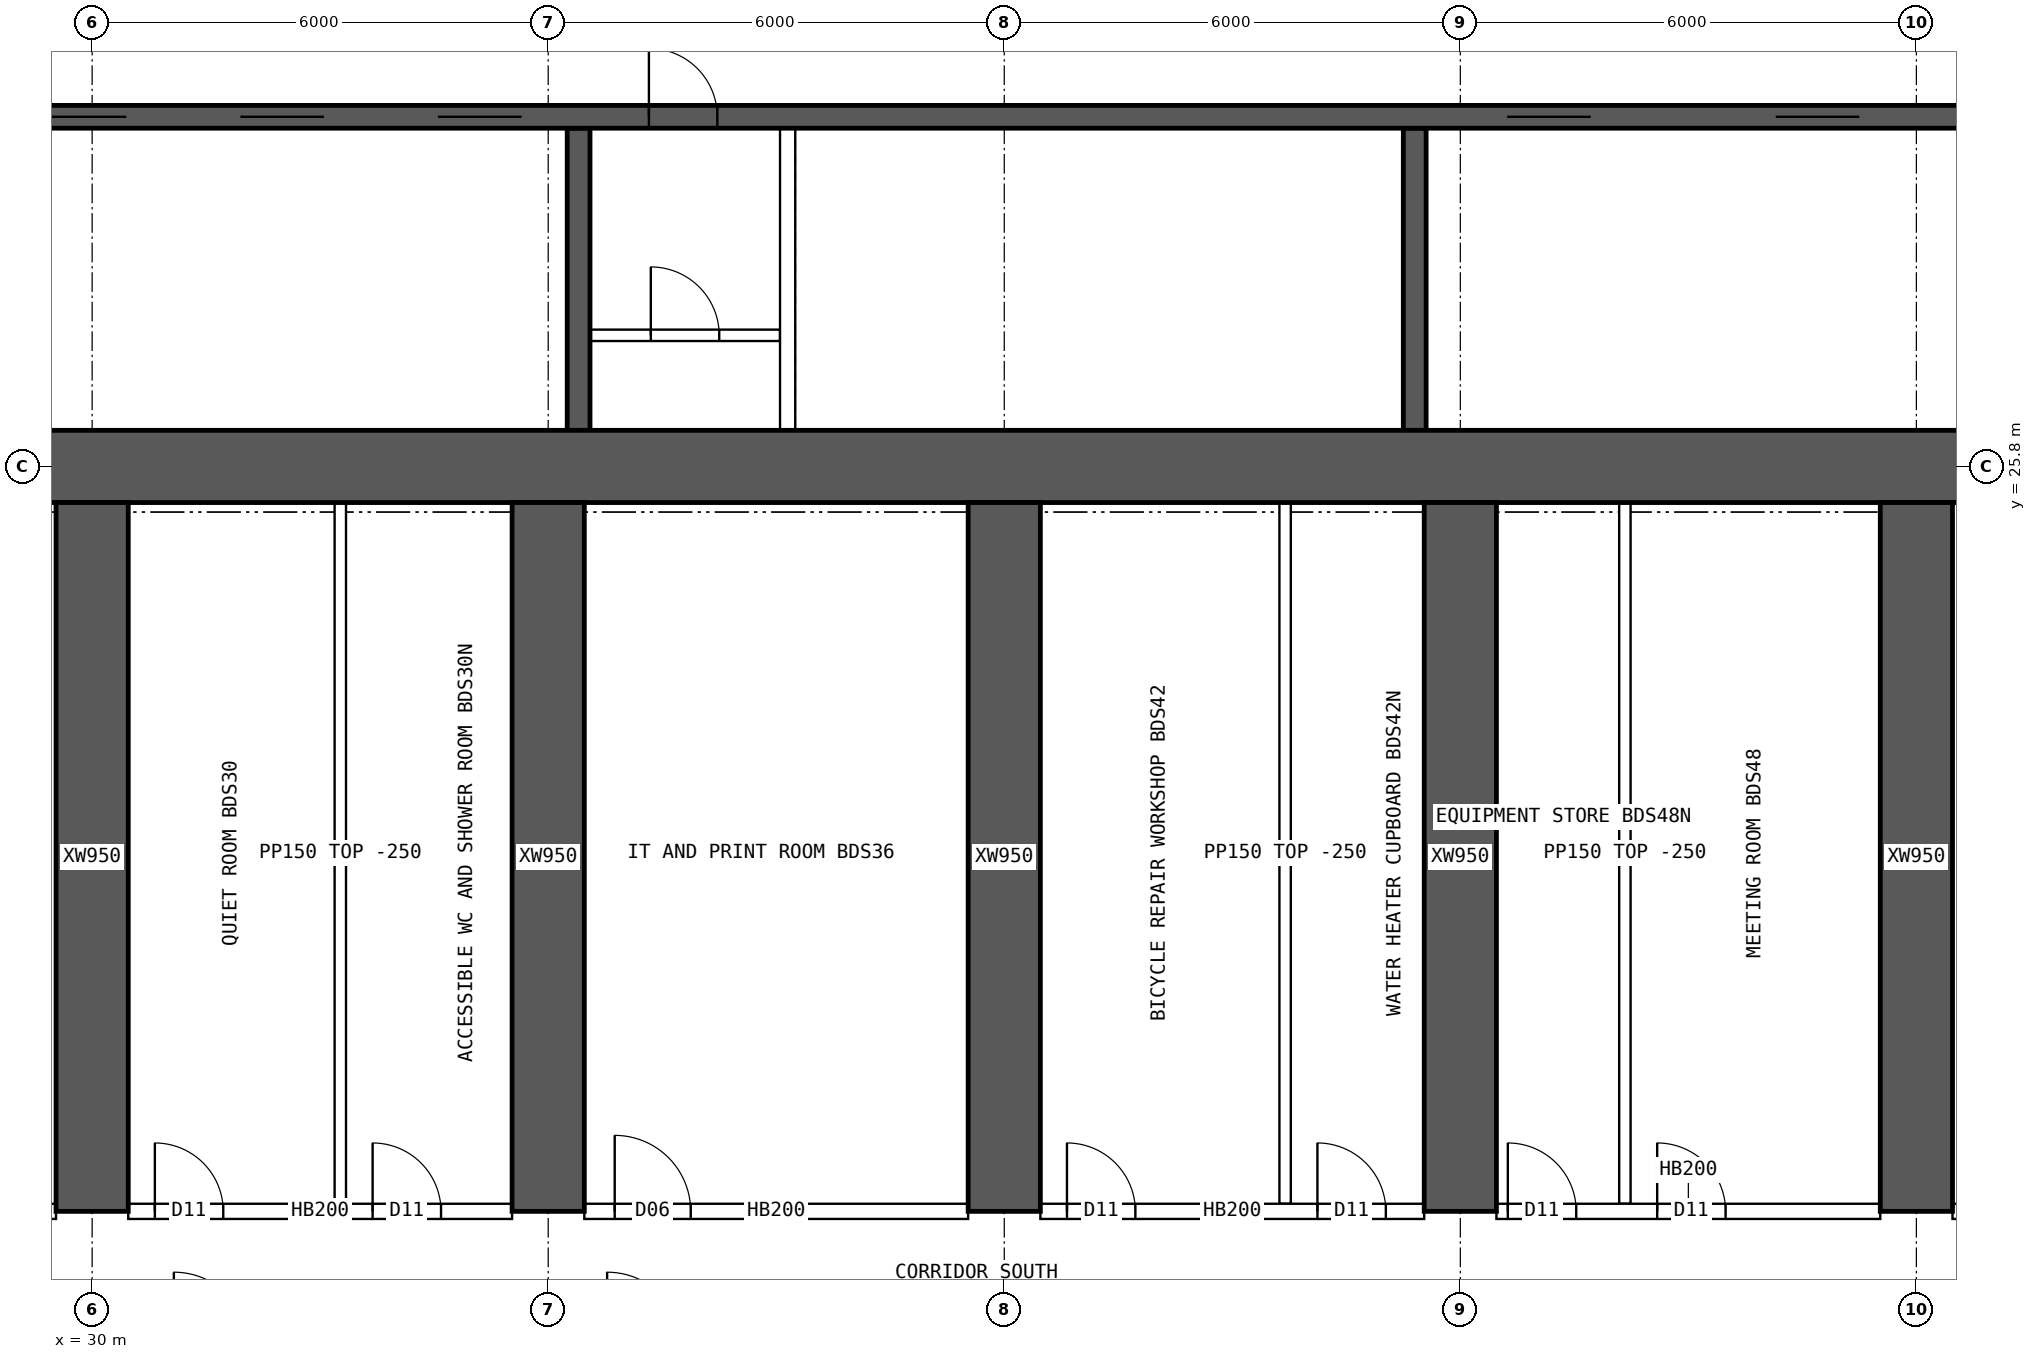
"""IFC4 building model, lengths in metres.
Left out: names, types, materials, properties, quantities, classifications, styles, units other than length and angle.
Written with IfcOpenShell. Run it as: python <this file> out.ifc"""

import sys

from ifc_helpers import new_model, si_unit, direction, frame, frame_2d, origin, place, context, subcontext, project, spatial, rectangle, extrude, element, fill, save


model = new_model("IFC4")
c1 = context("Model", 3, precision=1e-05, world=origin(), true_north=direction((0.0, 1.0)))
c2 = subcontext(c1, "Body", "Model", "MODEL_VIEW")
j1 = project(units=[si_unit("LENGTHUNIT", "METRE"), si_unit("PLANEANGLEUNIT", "RADIAN")], contexts=[c1])
p1 = place(None, origin())
s1 = spatial("IfcSite", under=j1, at=p1, CompositionType="ELEMENT")
p2 = place(p1, origin())
s2 = spatial("IfcBuilding", under=s1, at=p2, CompositionType="ELEMENT")
p3 = place(p2, frame((0.0, 0.0, 106.9)))
s3 = spatial("IfcBuildingStorey", under=s2, at=p3, CompositionType="ELEMENT", Elevation=106.9)
p4 = place(p3, frame((18.0, 25.8, 0.0), z_axis=(0.0, 0.0, 1.0), x_axis=(1.0, 0.0, 0.0)))
e1 = element("IfcWall", 1, at=p4, inside=s3, PredefinedType="SHEAR", context=c2, shape_type="SweptSolid", body=[
    extrude(rectangle(XDim=48.0, YDim=0.95, at=frame_2d((24.0, 0.0))), origin(), (0.0, 0.0, 1.0), 3.75),
])
p5 = place(p3, frame((18.475, 30.4, 0.0), z_axis=(0.0, 0.0, 1.0), x_axis=(1.0, 0.0, 0.0)))
e2 = element("IfcWall", 2, at=p5, inside=s3, PredefinedType="SHEAR", context=c2, shape_type="SweptSolid", body=[
    extrude(rectangle(XDim=47.05, YDim=0.3, at=frame_2d((23.525, 0.0))), origin(), (0.0, 0.0, 1.0), 3.75),
])
p6 = place(p5, frame((0.4, 0.0, 0.0)))
e3 = element("IfcOpeningElement", 3, at=p6, cuts=e2, PredefinedType="OPENING", context=c2, shape_type="SweptSolid", body=[
    extrude(rectangle(XDim=1.0, YDim=2.1, at=frame_2d((0.5, 1.05))), frame((0.0, 0.16, 0.0), z_axis=(0.0, -1.0, 0.0), x_axis=(1.0, 0.0, 0.0)), (0.0, 0.0, 1.0), 0.32),
])
p7 = place(p5, frame((45.65, 0.0, 0.0)))
e4 = element("IfcOpeningElement", 4, at=p7, cuts=e2, PredefinedType="OPENING", context=c2, shape_type="SweptSolid", body=[
    extrude(rectangle(XDim=1.0, YDim=2.1, at=frame_2d((0.5, 1.05))), frame((0.0, 0.16, 0.0), z_axis=(0.0, -1.0, 0.0), x_axis=(1.0, 0.0, 0.0)), (0.0, 0.0, 1.0), 0.32),
])
p8 = place(p5, frame((8.275, 0.0, 0.0)))
e5 = element("IfcOpeningElement", 5, at=p8, cuts=e2, PredefinedType="OPENING", context=c2, shape_type="SweptSolid", body=[
    extrude(rectangle(XDim=1.1, YDim=2.1, at=frame_2d((0.55, 1.05))), frame((0.0, 0.16, 0.0), z_axis=(0.0, -1.0, 0.0), x_axis=(1.0, 0.0, 0.0)), (0.0, 0.0, 1.0), 0.32),
])
p9 = place(p5, frame((10.875, 0.0, 0.0)))
e6 = element("IfcOpeningElement", 6, at=p9, cuts=e2, PredefinedType="OPENING", context=c2, shape_type="SweptSolid", body=[
    extrude(rectangle(XDim=1.1, YDim=2.1, at=frame_2d((0.55, 1.05))), frame((0.0, 0.16, 0.0), z_axis=(0.0, -1.0, 0.0), x_axis=(1.0, 0.0, 0.0)), (0.0, 0.0, 1.0), 0.32),
])
p10 = place(p5, frame((13.475, 0.0, 0.0)))
e7 = element("IfcOpeningElement", 7, at=p10, cuts=e2, PredefinedType="OPENING", context=c2, shape_type="SweptSolid", body=[
    extrude(rectangle(XDim=1.1, YDim=2.1, at=frame_2d((0.55, 1.05))), frame((0.0, 0.16, 0.0), z_axis=(0.0, -1.0, 0.0), x_axis=(1.0, 0.0, 0.0)), (0.0, 0.0, 1.0), 0.32),
])
p11 = place(p5, frame((16.075, 0.0, 0.0)))
e8 = element("IfcOpeningElement", 8, at=p11, cuts=e2, PredefinedType="OPENING", context=c2, shape_type="SweptSolid", body=[
    extrude(rectangle(XDim=1.1, YDim=2.1, at=frame_2d((0.55, 1.05))), frame((0.0, 0.16, 0.0), z_axis=(0.0, -1.0, 0.0), x_axis=(1.0, 0.0, 0.0)), (0.0, 0.0, 1.0), 0.32),
])
p12 = place(p5, frame((18.85, 0.0, 0.0)))
e9 = element("IfcOpeningElement", 9, at=p12, cuts=e2, PredefinedType="OPENING", context=c2, shape_type="SweptSolid", body=[
    extrude(rectangle(XDim=0.9, YDim=2.1, at=frame_2d((0.45, 1.05))), frame((0.0, 0.16, 0.0), z_axis=(0.0, -1.0, 0.0), x_axis=(1.0, 0.0, 0.0)), (0.0, 0.0, 1.0), 0.32),
])
p13 = place(p5, frame((30.142, 0.0, 0.0)))
e10 = element("IfcOpeningElement", 10, at=p13, cuts=e2, PredefinedType="OPENING", context=c2, shape_type="SweptSolid", body=[
    extrude(rectangle(XDim=1.1, YDim=2.1, at=frame_2d((0.55, 1.05))), frame((0.0, 0.16, 0.0), z_axis=(0.0, -1.0, 0.0), x_axis=(1.0, 0.0, 0.0)), (0.0, 0.0, 1.0), 0.32),
])
p14 = place(p5, frame((33.675, 0.0, 0.0)))
e11 = element("IfcOpeningElement", 11, at=p14, cuts=e2, PredefinedType="OPENING", context=c2, shape_type="SweptSolid", body=[
    extrude(rectangle(XDim=1.1, YDim=2.1, at=frame_2d((0.55, 1.05))), frame((0.0, 0.16, 0.0), z_axis=(0.0, -1.0, 0.0), x_axis=(1.0, 0.0, 0.0)), (0.0, 0.0, 1.0), 0.32),
])
p15 = place(p5, frame((37.208, 0.0, 0.0)))
e12 = element("IfcOpeningElement", 12, at=p15, cuts=e2, PredefinedType="OPENING", context=c2, shape_type="SweptSolid", body=[
    extrude(rectangle(XDim=1.1, YDim=2.1, at=frame_2d((0.55, 1.05))), frame((0.0, 0.16, 0.0), z_axis=(0.0, -1.0, 0.0), x_axis=(1.0, 0.0, 0.0)), (0.0, 0.0, 1.0), 0.32),
])
for number, where, z_axis, x_axis in (
    (13, (36.4, 26.275, 0.0), (0.0, 0.0, 1.0), (0.0, 1.0, 0.0)),
    (14, (47.4, 26.275, 0.0), (0.0, 0.0, 1.0), (0.0, 1.0, 0.0)),
):
    element("IfcWall", number, at=place(p3, frame(where, z_axis=z_axis, x_axis=x_axis)), inside=s3, PredefinedType="SHEAR", context=c2, shape_type="SweptSolid", body=[
        extrude(rectangle(XDim=3.975, YDim=0.3, at=frame_2d((1.988, 0.0))), origin(), (0.0, 0.0, 1.0), 3.75),
    ])
for number, where, z_axis, x_axis in (
    (15, (30.0, 16.0, 0.0), (0.0, 0.0, 1.0), (0.0, 1.0, 0.0)),
    (16, (36.0, 16.0, 0.0), (0.0, 0.0, 1.0), (0.0, 1.0, 0.0)),
    (17, (42.0, 16.0, 0.0), (0.0, 0.0, 1.0), (0.0, 1.0, 0.0)),
    (18, (48.0, 16.0, 0.0), (0.0, 0.0, 1.0), (0.0, 1.0, 0.0)),
    (19, (54.0, 16.0, 0.0), (0.0, 0.0, 1.0), (0.0, 1.0, 0.0)),
):
    element("IfcWall", number, at=place(p3, frame(where, z_axis=z_axis, x_axis=x_axis)), inside=s3, PredefinedType="SHEAR", context=c2, shape_type="SweptSolid", body=[
        extrude(rectangle(XDim=9.325, YDim=0.95, at=frame_2d((4.663, 0.0))), origin(), (0.0, 0.0, 1.0), 3.75),
    ])
p16 = place(p3, frame((36.55, 27.525, 0.0), z_axis=(0.0, 0.0, 1.0), x_axis=(1.0, 0.0, 0.0)))
e20 = element("IfcWall", 20, at=p16, inside=s3, PredefinedType="SOLIDWALL", context=c2, shape_type="SweptSolid", body=[
    extrude(rectangle(XDim=2.5, YDim=0.15, at=frame_2d((1.25, 0.0))), origin(), (0.0, 0.0, 1.0), 3.5),
])
p17 = place(p16, frame((0.8, 0.0, 0.0)))
e21 = element("IfcOpeningElement", 21, at=p17, cuts=e20, PredefinedType="OPENING", context=c2, shape_type="SweptSolid", body=[
    extrude(rectangle(XDim=0.9, YDim=2.1, at=frame_2d((0.45, 1.05))), frame((0.0, 0.085, 0.0), z_axis=(0.0, -1.0, 0.0), x_axis=(1.0, 0.0, 0.0)), (0.0, 0.0, 1.0), 0.17),
])
p18 = place(p3, frame((39.15, 26.275, 0.0), z_axis=(0.0, 0.0, 1.0), x_axis=(0.0, 1.0, 0.0)))
e22 = element("IfcWall", 22, at=p18, inside=s3, PredefinedType="SOLIDWALL", context=c2, shape_type="SweptSolid", body=[
    extrude(rectangle(XDim=3.975, YDim=0.2, at=frame_2d((1.988, 0.0))), origin(), (0.0, 0.0, 1.0), 3.5),
])
p19 = place(p3, frame((24.475, 16.0, 0.0), z_axis=(0.0, 0.0, 1.0), x_axis=(1.0, 0.0, 0.0)))
e23 = element("IfcWall", 23, at=p19, inside=s3, PredefinedType="SOLIDWALL", context=c2, shape_type="SweptSolid", body=[
    extrude(rectangle(XDim=5.05, YDim=0.2, at=frame_2d((2.525, 0.0))), origin(), (0.0, 0.0, 1.0), 3.5),
])
p20 = place(p19, frame((0.4, 0.0, 0.0)))
e24 = element("IfcOpeningElement", 24, at=p20, cuts=e23, PredefinedType="OPENING", context=c2, shape_type="SweptSolid", body=[
    extrude(rectangle(XDim=1.0, YDim=2.1, at=frame_2d((0.5, 1.05))), frame((0.0, 0.11, 0.0), z_axis=(0.0, -1.0, 0.0), x_axis=(1.0, 0.0, 0.0)), (0.0, 0.0, 1.0), 0.22),
])
p21 = place(p3, frame((30.475, 16.0, 0.0), z_axis=(0.0, 0.0, 1.0), x_axis=(1.0, 0.0, 0.0)))
e25 = element("IfcWall", 25, at=p21, inside=s3, PredefinedType="SOLIDWALL", context=c2, shape_type="SweptSolid", body=[
    extrude(rectangle(XDim=5.05, YDim=0.2, at=frame_2d((2.525, 0.0))), origin(), (0.0, 0.0, 1.0), 3.5),
])
p22 = place(p21, frame((0.35, 0.0, 0.0)))
e26 = element("IfcOpeningElement", 26, at=p22, cuts=e25, PredefinedType="OPENING", context=c2, shape_type="SweptSolid", body=[
    extrude(rectangle(XDim=0.9, YDim=2.1, at=frame_2d((0.45, 1.05))), frame((0.0, 0.11, 0.0), z_axis=(0.0, -1.0, 0.0), x_axis=(1.0, 0.0, 0.0)), (0.0, 0.0, 1.0), 0.22),
])
p23 = place(p21, frame((3.215, 0.0, 0.0)))
e27 = element("IfcOpeningElement", 27, at=p23, cuts=e25, PredefinedType="OPENING", context=c2, shape_type="SweptSolid", body=[
    extrude(rectangle(XDim=0.9, YDim=2.1, at=frame_2d((0.45, 1.05))), frame((0.0, 0.11, 0.0), z_axis=(0.0, -1.0, 0.0), x_axis=(1.0, 0.0, 0.0)), (0.0, 0.0, 1.0), 0.22),
])
p24 = place(p3, frame((36.475, 16.0, 0.0), z_axis=(0.0, 0.0, 1.0), x_axis=(1.0, 0.0, 0.0)))
e28 = element("IfcWall", 28, at=p24, inside=s3, PredefinedType="SOLIDWALL", context=c2, shape_type="SweptSolid", body=[
    extrude(rectangle(XDim=5.05, YDim=0.2, at=frame_2d((2.525, 0.0))), origin(), (0.0, 0.0, 1.0), 3.5),
])
p25 = place(p24, frame((0.4, 0.0, 0.0)))
e29 = element("IfcOpeningElement", 29, at=p25, cuts=e28, PredefinedType="OPENING", context=c2, shape_type="SweptSolid", body=[
    extrude(rectangle(XDim=1.0, YDim=2.1, at=frame_2d((0.5, 1.05))), frame((0.0, 0.11, 0.0), z_axis=(0.0, -1.0, 0.0), x_axis=(1.0, 0.0, 0.0)), (0.0, 0.0, 1.0), 0.22),
])
p26 = place(p3, frame((42.475, 16.0, 0.0), z_axis=(0.0, 0.0, 1.0), x_axis=(1.0, 0.0, 0.0)))
e30 = element("IfcWall", 30, at=p26, inside=s3, PredefinedType="SOLIDWALL", context=c2, shape_type="SweptSolid", body=[
    extrude(rectangle(XDim=5.05, YDim=0.2, at=frame_2d((2.525, 0.0))), origin(), (0.0, 0.0, 1.0), 3.5),
])
p27 = place(p26, frame((0.35, 0.0, 0.0)))
e31 = element("IfcOpeningElement", 31, at=p27, cuts=e30, PredefinedType="OPENING", context=c2, shape_type="SweptSolid", body=[
    extrude(rectangle(XDim=0.9, YDim=2.1, at=frame_2d((0.45, 1.05))), frame((0.0, 0.11, 0.0), z_axis=(0.0, -1.0, 0.0), x_axis=(1.0, 0.0, 0.0)), (0.0, 0.0, 1.0), 0.22),
])
p28 = place(p26, frame((3.645, 0.0, 0.0)))
e32 = element("IfcOpeningElement", 32, at=p28, cuts=e30, PredefinedType="OPENING", context=c2, shape_type="SweptSolid", body=[
    extrude(rectangle(XDim=0.9, YDim=2.1, at=frame_2d((0.45, 1.05))), frame((0.0, 0.11, 0.0), z_axis=(0.0, -1.0, 0.0), x_axis=(1.0, 0.0, 0.0)), (0.0, 0.0, 1.0), 0.22),
])
p29 = place(p3, frame((48.475, 16.0, 0.0), z_axis=(0.0, 0.0, 1.0), x_axis=(1.0, 0.0, 0.0)))
e33 = element("IfcWall", 33, at=p29, inside=s3, PredefinedType="SOLIDWALL", context=c2, shape_type="SweptSolid", body=[
    extrude(rectangle(XDim=5.05, YDim=0.2, at=frame_2d((2.525, 0.0))), origin(), (0.0, 0.0, 1.0), 3.5),
])
p30 = place(p29, frame((0.15, 0.0, 0.0)))
e34 = element("IfcOpeningElement", 34, at=p30, cuts=e33, PredefinedType="OPENING", context=c2, shape_type="SweptSolid", body=[
    extrude(rectangle(XDim=0.9, YDim=2.1, at=frame_2d((0.45, 1.05))), frame((0.0, 0.11, 0.0), z_axis=(0.0, -1.0, 0.0), x_axis=(1.0, 0.0, 0.0)), (0.0, 0.0, 1.0), 0.22),
])
p31 = place(p29, frame((2.115, 0.0, 0.0)))
e35 = element("IfcOpeningElement", 35, at=p31, cuts=e33, PredefinedType="OPENING", context=c2, shape_type="SweptSolid", body=[
    extrude(rectangle(XDim=0.9, YDim=2.1, at=frame_2d((0.45, 1.05))), frame((0.0, 0.11, 0.0), z_axis=(0.0, -1.0, 0.0), x_axis=(1.0, 0.0, 0.0)), (0.0, 0.0, 1.0), 0.22),
])
p32 = place(p3, frame((54.475, 16.0, 0.0), z_axis=(0.0, 0.0, 1.0), x_axis=(1.0, 0.0, 0.0)))
e36 = element("IfcWall", 36, at=p32, inside=s3, PredefinedType="SOLIDWALL", context=c2, shape_type="SweptSolid", body=[
    extrude(rectangle(XDim=5.05, YDim=0.2, at=frame_2d((2.525, 0.0))), origin(), (0.0, 0.0, 1.0), 3.5),
])
p33 = place(p32, frame((0.35, 0.0, 0.0)))
e37 = element("IfcOpeningElement", 37, at=p33, cuts=e36, PredefinedType="OPENING", context=c2, shape_type="SweptSolid", body=[
    extrude(rectangle(XDim=0.9, YDim=2.1, at=frame_2d((0.45, 1.05))), frame((0.0, 0.11, 0.0), z_axis=(0.0, -1.0, 0.0), x_axis=(1.0, 0.0, 0.0)), (0.0, 0.0, 1.0), 0.22),
])
p34 = place(p32, frame((3.955, 0.0, 0.0)))
e38 = element("IfcOpeningElement", 38, at=p34, cuts=e36, PredefinedType="OPENING", context=c2, shape_type="SweptSolid", body=[
    extrude(rectangle(XDim=0.9, YDim=2.1, at=frame_2d((0.45, 1.05))), frame((0.0, 0.11, 0.0), z_axis=(0.0, -1.0, 0.0), x_axis=(1.0, 0.0, 0.0)), (0.0, 0.0, 1.0), 0.22),
])
for number, where, z_axis, x_axis in (
    (39, (33.265, 16.1, 0.0), (0.0, 0.0, 1.0), (0.0, 1.0, 0.0)),
    (40, (45.695, 16.1, 0.0), (0.0, 0.0, 1.0), (0.0, 1.0, 0.0)),
    (41, (50.165, 16.1, 0.0), (0.0, 0.0, 1.0), (0.0, 1.0, 0.0)),
):
    element("IfcWall", number, at=place(p3, frame(where, z_axis=z_axis, x_axis=x_axis)), inside=s3, PredefinedType="PARTITIONING", context=c2, shape_type="SweptSolid", body=[
        extrude(rectangle(XDim=9.225, YDim=0.15, at=frame_2d((4.612, 0.0))), origin(), (0.0, 0.0, 1.0), 3.5),
    ])
p35 = place(p9, origin())
e42 = element("IfcDoor", 42, at=p35, inside=s3, OperationType="DOUBLE_DOOR_SLIDING", PredefinedType="DOOR", context=c2, shape_type="SweptSolid", body=[
    extrude(rectangle(XDim=1.1, YDim=2.1, at=frame_2d((0.55, 1.05))), frame((0.0, 0.025, 0.0), z_axis=(0.0, -1.0, 0.0), x_axis=(1.0, 0.0, 0.0)), (0.0, 0.0, 1.0), 0.05),
])
fill(e6, e42)
p36 = place(p10, origin())
e43 = element("IfcDoor", 43, at=p36, inside=s3, OperationType="DOUBLE_DOOR_SLIDING", PredefinedType="DOOR", context=c2, shape_type="SweptSolid", body=[
    extrude(rectangle(XDim=1.1, YDim=2.1, at=frame_2d((0.55, 1.05))), frame((0.0, 0.025, 0.0), z_axis=(0.0, -1.0, 0.0), x_axis=(1.0, 0.0, 0.0)), (0.0, 0.0, 1.0), 0.05),
])
fill(e7, e43)
p37 = place(p11, origin())
e44 = element("IfcDoor", 44, at=p37, inside=s3, OperationType="DOUBLE_DOOR_SLIDING", PredefinedType="DOOR", context=c2, shape_type="SweptSolid", body=[
    extrude(rectangle(XDim=1.1, YDim=2.1, at=frame_2d((0.55, 1.05))), frame((0.0, 0.025, 0.0), z_axis=(0.0, -1.0, 0.0), x_axis=(1.0, 0.0, 0.0)), (0.0, 0.0, 1.0), 0.05),
])
fill(e8, e44)
p38 = place(p17, origin())
e45 = element("IfcDoor", 45, at=p38, inside=s3, OperationType="SINGLE_SWING_LEFT", PredefinedType="DOOR", context=c2, shape_type="SweptSolid", body=[
    extrude(rectangle(XDim=0.9, YDim=2.1, at=frame_2d((0.45, 1.05))), frame((0.0, 0.025, 0.0), z_axis=(0.0, -1.0, 0.0), x_axis=(1.0, 0.0, 0.0)), (0.0, 0.0, 1.0), 0.05),
])
fill(e21, e45)
p39 = place(p12, origin())
e46 = element("IfcDoor", 46, at=p39, inside=s3, OperationType="SINGLE_SWING_LEFT", PredefinedType="DOOR", context=c2, shape_type="SweptSolid", body=[
    extrude(rectangle(XDim=0.9, YDim=2.1, at=frame_2d((0.45, 1.05))), frame((0.0, 0.025, 0.0), z_axis=(0.0, -1.0, 0.0), x_axis=(1.0, 0.0, 0.0)), (0.0, 0.0, 1.0), 0.05),
])
fill(e9, e46)
p40 = place(p13, origin())
e47 = element("IfcDoor", 47, at=p40, inside=s3, OperationType="DOUBLE_DOOR_SLIDING", PredefinedType="DOOR", context=c2, shape_type="SweptSolid", body=[
    extrude(rectangle(XDim=1.1, YDim=2.1, at=frame_2d((0.55, 1.05))), frame((0.0, 0.025, 0.0), z_axis=(0.0, -1.0, 0.0), x_axis=(1.0, 0.0, 0.0)), (0.0, 0.0, 1.0), 0.05),
])
fill(e10, e47)
p41 = place(p14, origin())
e48 = element("IfcDoor", 48, at=p41, inside=s3, OperationType="DOUBLE_DOOR_SLIDING", PredefinedType="DOOR", context=c2, shape_type="SweptSolid", body=[
    extrude(rectangle(XDim=1.1, YDim=2.1, at=frame_2d((0.55, 1.05))), frame((0.0, 0.025, 0.0), z_axis=(0.0, -1.0, 0.0), x_axis=(1.0, 0.0, 0.0)), (0.0, 0.0, 1.0), 0.05),
])
fill(e11, e48)
p42 = place(p22, origin())
e49 = element("IfcDoor", 49, at=p42, inside=s3, OperationType="SINGLE_SWING_LEFT", PredefinedType="DOOR", context=c2, shape_type="SweptSolid", body=[
    extrude(rectangle(XDim=0.9, YDim=2.1, at=frame_2d((0.45, 1.05))), frame((0.0, 0.025, 0.0), z_axis=(0.0, -1.0, 0.0), x_axis=(1.0, 0.0, 0.0)), (0.0, 0.0, 1.0), 0.05),
])
fill(e26, e49)
p43 = place(p23, origin())
e50 = element("IfcDoor", 50, at=p43, inside=s3, OperationType="SINGLE_SWING_LEFT", PredefinedType="DOOR", context=c2, shape_type="SweptSolid", body=[
    extrude(rectangle(XDim=0.9, YDim=2.1, at=frame_2d((0.45, 1.05))), frame((0.0, 0.025, 0.0), z_axis=(0.0, -1.0, 0.0), x_axis=(1.0, 0.0, 0.0)), (0.0, 0.0, 1.0), 0.05),
])
fill(e27, e50)
p44 = place(p25, origin())
e51 = element("IfcDoor", 51, at=p44, inside=s3, OperationType="SINGLE_SWING_LEFT", PredefinedType="DOOR", context=c2, shape_type="SweptSolid", body=[
    extrude(rectangle(XDim=1.0, YDim=2.1, at=frame_2d((0.5, 1.05))), frame((0.0, 0.025, 0.0), z_axis=(0.0, -1.0, 0.0), x_axis=(1.0, 0.0, 0.0)), (0.0, 0.0, 1.0), 0.05),
])
fill(e29, e51)
p45 = place(p27, origin())
e52 = element("IfcDoor", 52, at=p45, inside=s3, OperationType="SINGLE_SWING_LEFT", PredefinedType="DOOR", context=c2, shape_type="SweptSolid", body=[
    extrude(rectangle(XDim=0.9, YDim=2.1, at=frame_2d((0.45, 1.05))), frame((0.0, 0.025, 0.0), z_axis=(0.0, -1.0, 0.0), x_axis=(1.0, 0.0, 0.0)), (0.0, 0.0, 1.0), 0.05),
])
fill(e31, e52)
p46 = place(p28, origin())
e53 = element("IfcDoor", 53, at=p46, inside=s3, OperationType="SINGLE_SWING_LEFT", PredefinedType="DOOR", context=c2, shape_type="SweptSolid", body=[
    extrude(rectangle(XDim=0.9, YDim=2.1, at=frame_2d((0.45, 1.05))), frame((0.0, 0.025, 0.0), z_axis=(0.0, -1.0, 0.0), x_axis=(1.0, 0.0, 0.0)), (0.0, 0.0, 1.0), 0.05),
])
fill(e32, e53)
p47 = place(p30, origin())
e54 = element("IfcDoor", 54, at=p47, inside=s3, OperationType="SINGLE_SWING_LEFT", PredefinedType="DOOR", context=c2, shape_type="SweptSolid", body=[
    extrude(rectangle(XDim=0.9, YDim=2.1, at=frame_2d((0.45, 1.05))), frame((0.0, 0.025, 0.0), z_axis=(0.0, -1.0, 0.0), x_axis=(1.0, 0.0, 0.0)), (0.0, 0.0, 1.0), 0.05),
])
fill(e34, e54)
p48 = place(p31, origin())
e55 = element("IfcDoor", 55, at=p48, inside=s3, OperationType="SINGLE_SWING_LEFT", PredefinedType="DOOR", context=c2, shape_type="SweptSolid", body=[
    extrude(rectangle(XDim=0.9, YDim=2.1, at=frame_2d((0.45, 1.05))), frame((0.0, 0.025, 0.0), z_axis=(0.0, -1.0, 0.0), x_axis=(1.0, 0.0, 0.0)), (0.0, 0.0, 1.0), 0.05),
])
fill(e35, e55)
save(model, sys.argv[1])
